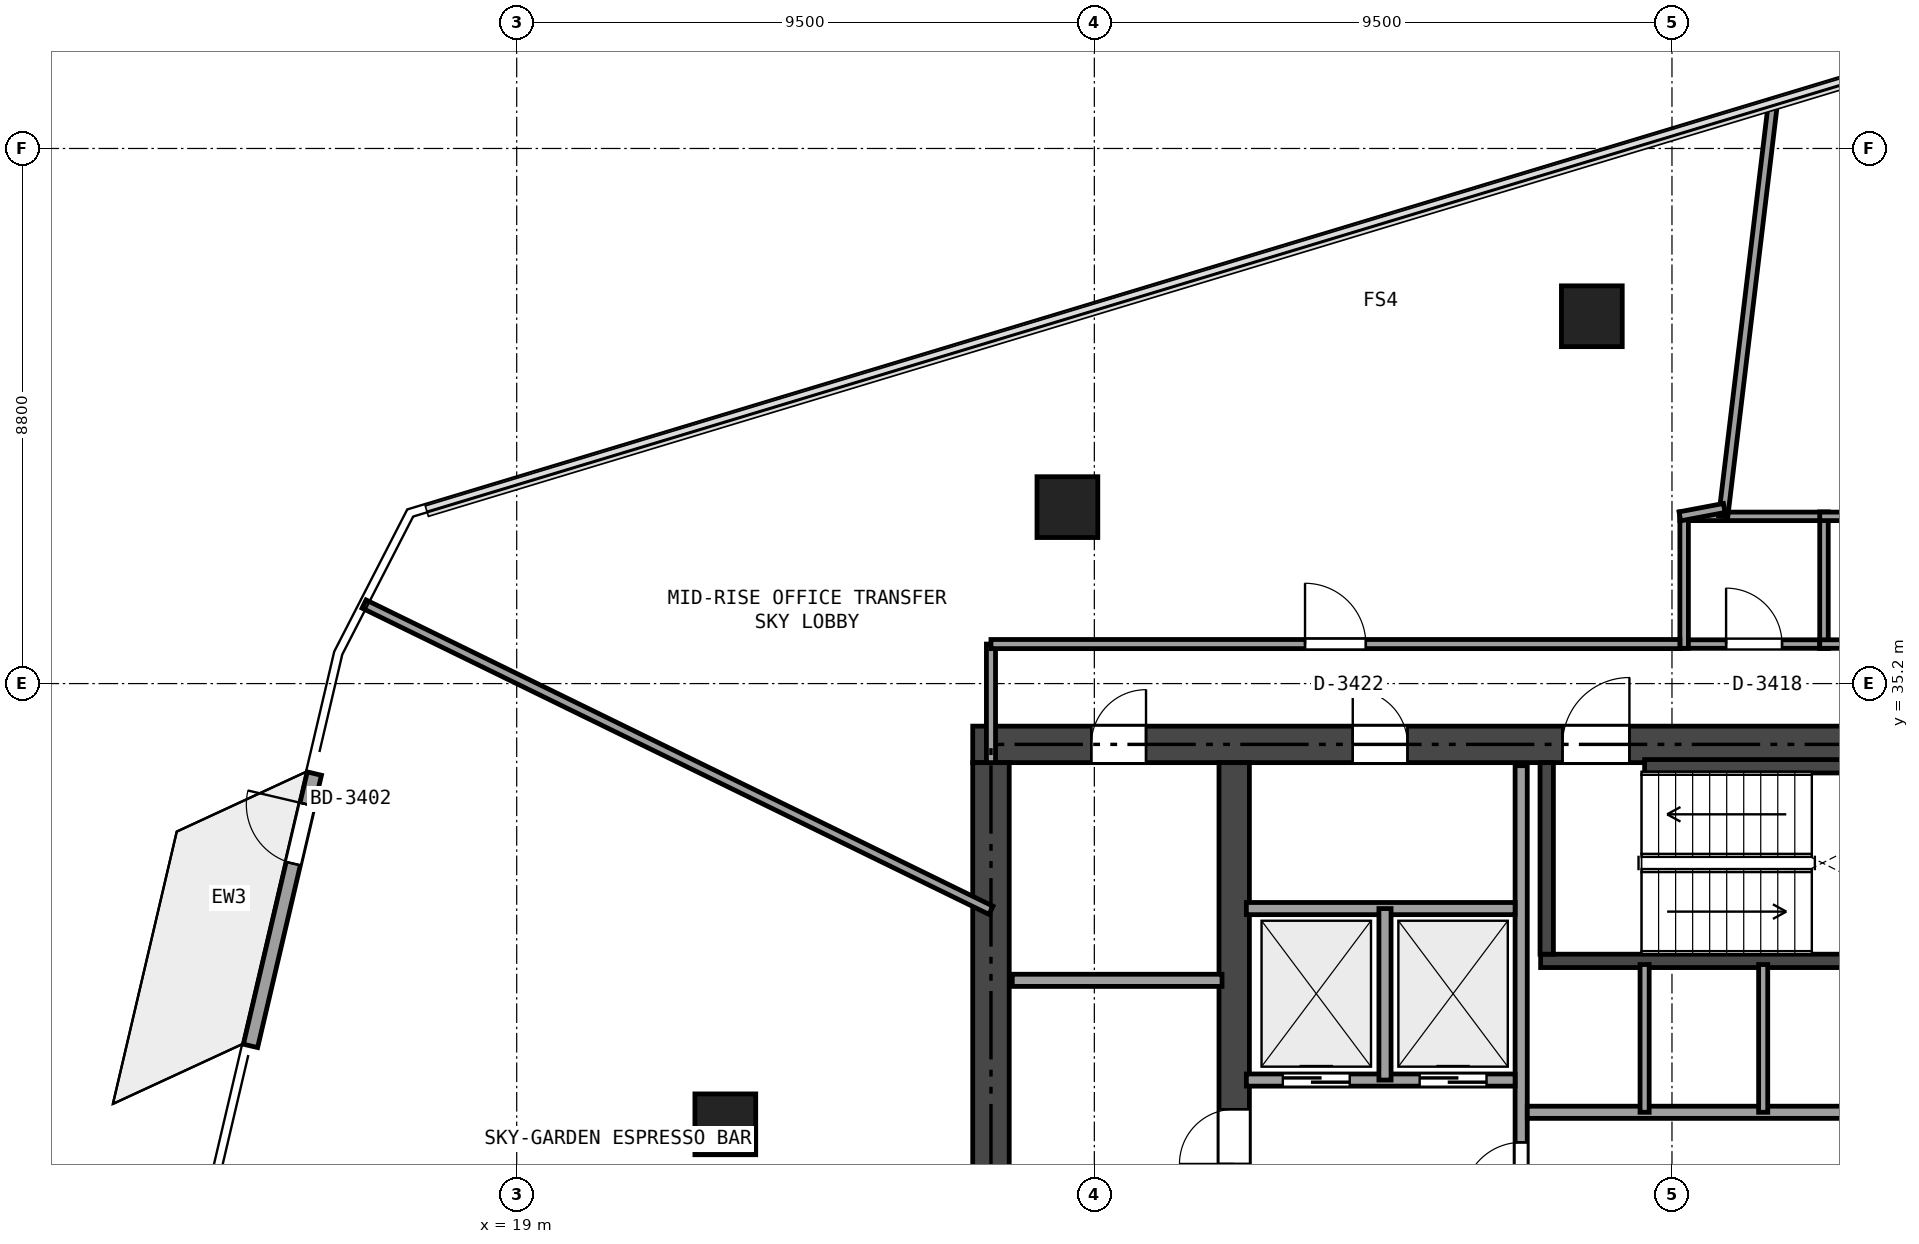
"""IFC4 building model, lengths in metres.
Left out: names, types, materials, properties, quantities, classifications, styles, units other than length and angle.
Written with IfcOpenShell. Run it as: python <this file> out.ifc"""

import sys

from ifc_helpers import new_model, si_unit, direction, frame, frame_2d, origin, origin_2d, place, context, subcontext, project, spatial, rectangle, extrude, element, fill, save


model = new_model("IFC4")
c1 = context("Model", 3, precision=1e-05, world=origin(), true_north=direction((0.0, 1.0)))
c2 = subcontext(c1, "Body", "Model", "MODEL_VIEW")
j1 = project(units=[si_unit("LENGTHUNIT", "METRE"), si_unit("PLANEANGLEUNIT", "RADIAN")], contexts=[c1])
p1 = place(None, origin())
s1 = spatial("IfcSite", under=j1, at=p1, CompositionType="ELEMENT")
p2 = place(p1, origin())
s2 = spatial("IfcBuilding", under=s1, at=p2, CompositionType="ELEMENT")
p3 = place(p2, frame((0.0, 0.0, 129.3)))
s3 = spatial("IfcBuildingStorey", under=s2, at=p3, CompositionType="ELEMENT", Elevation=129.3)
p4 = place(p3, frame((26.5, 34.2, 0.0), z_axis=(0.0, 0.0, 1.0), x_axis=(1.0, 0.0, 0.0)))
e1 = element("IfcWall", 1, at=p4, inside=s3, PredefinedType="SHEAR", context=c2, shape_type="SweptSolid", body=[
    extrude(rectangle(XDim=21.4, YDim=0.6, at=frame_2d((10.7, 0.0))), origin(), (0.0, 0.0, 1.0), 3.32),
])
p5 = place(p4, frame((9.7, 0.0, 0.0)))
e2 = element("IfcOpeningElement", 2, at=p5, cuts=e1, PredefinedType="OPENING", context=c2, shape_type="SweptSolid", body=[
    extrude(rectangle(XDim=1.1, YDim=2.15, at=frame_2d((0.55, 1.075))), frame((0.0, 0.31, 0.0), z_axis=(0.0, -1.0, 0.0), x_axis=(1.0, 0.0, 0.0)), (0.0, 0.0, 1.0), 0.62),
])
p6 = place(p4, frame((1.95, 0.0, 0.0)))
e3 = element("IfcOpeningElement", 3, at=p6, cuts=e1, PredefinedType="OPENING", context=c2, shape_type="SweptSolid", body=[
    extrude(rectangle(XDim=0.9, YDim=2.1, at=frame_2d((0.45, 1.05))), frame((0.0, 0.31, 0.0), z_axis=(0.0, -1.0, 0.0), x_axis=(1.0, 0.0, 0.0)), (0.0, 0.0, 1.0), 0.62),
])
p7 = place(p4, frame((6.25, 0.0, 0.0)))
e4 = element("IfcOpeningElement", 4, at=p7, cuts=e1, PredefinedType="OPENING", context=c2, shape_type="SweptSolid", body=[
    extrude(rectangle(XDim=0.9, YDim=2.1, at=frame_2d((0.45, 1.05))), frame((0.0, 0.31, 0.0), z_axis=(0.0, -1.0, 0.0), x_axis=(1.0, 0.0, 0.0)), (0.0, 0.0, 1.0), 0.62),
])
p8 = place(p3, frame((26.8, 18.9, 0.0), z_axis=(0.0, 0.0, 1.0), x_axis=(0.0, 1.0, 0.0)))
e5 = element("IfcWall", 5, at=p8, inside=s3, PredefinedType="SHEAR", context=c2, shape_type="SweptSolid", body=[
    extrude(rectangle(XDim=15.0, YDim=0.6, at=frame_2d((7.5, 0.0))), origin(), (0.0, 0.0, 1.0), 3.32),
])
p9 = place(p3, frame((30.8, 18.9, 0.0), z_axis=(0.0, 0.0, 1.0), x_axis=(0.0, 1.0, 0.0)))
e6 = element("IfcWall", 6, at=p9, inside=s3, PredefinedType="SHEAR", context=c2, shape_type="SweptSolid", body=[
    extrude(rectangle(XDim=15.0, YDim=0.5, at=frame_2d((7.5, 0.0))), origin(), (0.0, 0.0, 1.0), 3.32),
])
p10 = place(p9, frame((6.6, 0.0, 0.0)))
e7 = element("IfcOpeningElement", 7, at=p10, cuts=e6, PredefinedType="OPENING", context=c2, shape_type="SweptSolid", body=[
    extrude(rectangle(XDim=1.1, YDim=2.15, at=frame_2d((0.55, 1.075))), frame((0.0, 0.26, 0.0), z_axis=(0.0, -1.0, 0.0), x_axis=(1.0, 0.0, 0.0)), (0.0, 0.0, 1.0), 0.52),
])
p11 = place(p9, frame((8.4, 0.0, 0.0)))
e8 = element("IfcOpeningElement", 8, at=p11, cuts=e6, PredefinedType="OPENING", context=c2, shape_type="SweptSolid", body=[
    extrude(rectangle(XDim=0.9, YDim=2.1, at=frame_2d((0.45, 1.05))), frame((0.0, 0.26, 0.0), z_axis=(0.0, -1.0, 0.0), x_axis=(1.0, 0.0, 0.0)), (0.0, 0.0, 1.0), 0.52),
])
p12 = place(p3, frame((35.84, 30.64, 0.0), z_axis=(0.0, 0.0, 1.0), x_axis=(1.0, 0.0, 0.0)))
e9 = element("IfcWall", 9, at=p12, inside=s3, PredefinedType="SHEAR", context=c2, shape_type="SweptSolid", body=[
    extrude(rectangle(XDim=7.61, YDim=0.22, at=frame_2d((3.805, 0.0))), origin(), (0.0, 0.0, 1.0), 3.32),
])
p13 = place(p3, frame((35.94, 30.75, 0.0), z_axis=(0.0, 0.0, 1.0), x_axis=(0.0, 1.0, 0.0)))
e10 = element("IfcWall", 10, at=p13, inside=s3, PredefinedType="SHEAR", context=c2, shape_type="SweptSolid", body=[
    extrude(rectangle(XDim=3.15, YDim=0.22, at=frame_2d((1.575, 0.0))), origin(), (0.0, 0.0, 1.0), 3.32),
])
p14 = place(p3, frame((37.55, 33.84, 0.0), z_axis=(0.0, 0.0, 1.0), x_axis=(1.0, 0.0, 0.0)))
e11 = element("IfcWall", 11, at=p14, inside=s3, PredefinedType="SHEAR", context=c2, shape_type="SweptSolid", body=[
    extrude(rectangle(XDim=5.9, YDim=0.22, at=frame_2d((2.95, 0.0))), origin(), (0.0, 0.0, 1.0), 3.32),
])
for number, where, z_axis, x_axis in (
    (12, (36.682, 41.241, 0.0), (0.0, 0.0, 1.0), (1.0, 0.0, 0.0)),
    (13, (28.057, 38.102, 0.0), (0.0, 0.0, 1.0), (1.0, 0.0, 0.0)),
    (14, (22.431, 27.952, 0.0), (0.0, 0.0, 1.0), (1.0, 0.0, 0.0)),
):
    element("IfcColumn", number, at=place(p3, frame(where, z_axis=z_axis, x_axis=x_axis)), inside=s3, PredefinedType="COLUMN", context=c2, shape_type="SweptSolid", body=[
        extrude(rectangle(XDim=1.0, YDim=1.0, at=origin_2d()), origin(), (0.0, 0.0, 1.0), 3.32),
    ])
p15 = place(p3, frame((14.622, 29.242, 0.0), z_axis=(0.0, 0.0, 1.0), x_axis=(0.228296670508, 0.973591613684, 0.0)))
e15 = element("IfcWall", 15, at=p15, inside=s3, PredefinedType="SOLIDWALL", context=c2, shape_type="SweptSolid", body=[
    extrude(rectangle(XDim=4.6, YDim=0.24, at=frame_2d((2.3, 0.0))), origin(), (0.0, 0.0, 1.0), 3.32),
])
p16 = place(p15, frame((3.079, 0.0, 0.0)))
e16 = element("IfcOpeningElement", 16, at=p16, cuts=e15, PredefinedType="OPENING", context=c2, shape_type="SweptSolid", body=[
    extrude(rectangle(XDim=1.0, YDim=2.15, at=frame_2d((0.5, 1.075))), frame((0.0, 0.13, 0.0), z_axis=(0.0, -1.0, 0.0), x_axis=(1.0, 0.0, 0.0)), (0.0, 0.0, 1.0), 0.26),
])
p17 = place(p3, frame((27.15, 30.32, 0.0), z_axis=(0.0, 0.0, 1.0), x_axis=(1.0, 0.0, 0.0)))
e17 = element("IfcWall", 17, at=p17, inside=s3, PredefinedType="SOLIDWALL", context=c2, shape_type="SweptSolid", body=[
    extrude(rectangle(XDim=3.45, YDim=0.2, at=frame_2d((1.725, 0.0))), origin(), (0.0, 0.0, 1.0), 3.32),
])
p18 = place(p3, frame((35.52, 18.95, 0.0), z_axis=(0.0, 0.0, 1.0), x_axis=(0.0, 1.0, 0.0)))
e18 = element("IfcWall", 18, at=p18, inside=s3, PredefinedType="SOLIDWALL", context=c2, shape_type="SweptSolid", body=[
    extrude(rectangle(XDim=14.9, YDim=0.2, at=frame_2d((7.45, 0.0))), origin(), (0.0, 0.0, 1.0), 2.841),
])
p19 = place(p18, frame((7.755, 0.0, 0.0)))
e19 = element("IfcOpeningElement", 19, at=p19, cuts=e18, PredefinedType="OPENING", context=c2, shape_type="SweptSolid", body=[
    extrude(rectangle(XDim=0.95, YDim=2.15, at=frame_2d((0.475, 1.075))), frame((0.0, 0.11, 0.0), z_axis=(0.0, -1.0, 0.0), x_axis=(1.0, 0.0, 0.0)), (0.0, 0.0, 1.0), 0.22),
])
p20 = place(p18, frame((0.6, 0.0, 0.0)))
e20 = element("IfcOpeningElement", 20, at=p20, cuts=e18, PredefinedType="OPENING", context=c2, shape_type="SweptSolid", body=[
    extrude(rectangle(XDim=0.9, YDim=2.1, at=frame_2d((0.45, 1.05))), frame((0.0, 0.11, 0.0), z_axis=(0.0, -1.0, 0.0), x_axis=(1.0, 0.0, 0.0)), (0.0, 0.0, 1.0), 0.22),
])
p21 = place(p3, frame((31.0, 28.68, 0.0), z_axis=(0.0, 0.0, 1.0), x_axis=(1.0, 0.0, 0.0)))
e21 = element("IfcWall", 21, at=p21, inside=s3, PredefinedType="SOLIDWALL", context=c2, shape_type="SweptSolid", body=[
    extrude(rectangle(XDim=4.42, YDim=0.2, at=frame_2d((2.21, 0.0))), origin(), (0.0, 0.0, 1.0), 3.32),
])
p22 = place(p21, frame((0.6, 0.0, 0.0)))
e22 = element("IfcOpeningElement", 22, at=p22, cuts=e21, PredefinedType="OPENING", context=c2, shape_type="SweptSolid", body=[
    extrude(rectangle(XDim=1.1, YDim=2.15, at=frame_2d((0.55, 1.075))), frame((0.0, 0.11, 0.0), z_axis=(0.0, -1.0, 0.0), x_axis=(1.0, 0.0, 0.0)), (0.0, 0.0, 1.0), 0.22),
])
p23 = place(p21, frame((2.85, 0.0, 0.0)))
e23 = element("IfcOpeningElement", 23, at=p23, cuts=e21, PredefinedType="OPENING", context=c2, shape_type="SweptSolid", body=[
    extrude(rectangle(XDim=1.1, YDim=2.15, at=frame_2d((0.55, 1.075))), frame((0.0, 0.11, 0.0), z_axis=(0.0, -1.0, 0.0), x_axis=(1.0, 0.0, 0.0)), (0.0, 0.0, 1.0), 0.22),
])
p24 = place(p3, frame((31.0, 31.5, 0.0), z_axis=(0.0, 0.0, 1.0), x_axis=(1.0, 0.0, 0.0)))
e24 = element("IfcWall", 24, at=p24, inside=s3, PredefinedType="SOLIDWALL", context=c2, shape_type="SweptSolid", body=[
    extrude(rectangle(XDim=4.42, YDim=0.2, at=frame_2d((2.21, 0.0))), origin(), (0.0, 0.0, 1.0), 3.32),
])
p25 = place(p3, frame((33.28, 28.68, 0.0), z_axis=(0.0, 0.0, 1.0), x_axis=(0.0, 1.0, 0.0)))
e25 = element("IfcWall", 25, at=p25, inside=s3, PredefinedType="SOLIDWALL", context=c2, shape_type="SweptSolid", body=[
    extrude(rectangle(XDim=2.82, YDim=0.2, at=frame_2d((1.41, 0.0))), origin(), (0.0, 0.0, 1.0), 3.32),
])
p26 = place(p3, frame((35.62, 28.15, 0.0), z_axis=(0.0, 0.0, 1.0), x_axis=(1.0, 0.0, 0.0)))
e26 = element("IfcWall", 26, at=p26, inside=s3, PredefinedType="SOLIDWALL", context=c2, shape_type="SweptSolid", body=[
    extrude(rectangle(XDim=7.88, YDim=0.2, at=frame_2d((3.94, 0.0))), origin(), (0.0, 0.0, 1.0), 3.32),
])
for number, where, z_axis, x_axis in (
    (27, (37.55, 28.15, 0.0), (0.0, 0.0, 1.0), (0.0, 1.0, 0.0)),
    (28, (39.5, 28.15, 0.0), (0.0, 0.0, 1.0), (0.0, 1.0, 0.0)),
):
    element("IfcWall", number, at=place(p3, frame(where, z_axis=z_axis, x_axis=x_axis)), inside=s3, PredefinedType="PARTITIONING", context=c2, shape_type="SweptSolid", body=[
        extrude(rectangle(XDim=2.43, YDim=0.15, at=frame_2d((1.215, 0.0))), origin(), (0.0, 0.0, 1.0), 3.32),
    ])
p27 = place(p3, frame((38.13, 35.85, 0.0), z_axis=(0.0, 0.0, 1.0), x_axis=(1.0, 0.0, 0.0)))
e29 = element("IfcWall", 29, at=p27, inside=s3, PredefinedType="PARTITIONING", context=c2, shape_type="SweptSolid", body=[
    extrude(rectangle(XDim=2.44, YDim=0.14, at=frame_2d((1.22, 0.0))), origin(), (0.0, 0.0, 1.0), 3.32),
])
p28 = place(p27, frame((0.76, 0.0, 0.0)))
e30 = element("IfcOpeningElement", 30, at=p28, cuts=e29, PredefinedType="OPENING", context=c2, shape_type="SweptSolid", body=[
    extrude(rectangle(XDim=0.92, YDim=2.1, at=frame_2d((0.46, 1.05))), frame((0.0, 0.08, 0.0), z_axis=(0.0, -1.0, 0.0), x_axis=(1.0, 0.0, 0.0)), (0.0, 0.0, 1.0), 0.16),
])
p29 = place(p3, frame((40.5, 35.78, 0.0), z_axis=(0.0, 0.0, 1.0), x_axis=(0.0, 1.0, 0.0)))
e31 = element("IfcWall", 31, at=p29, inside=s3, PredefinedType="PARTITIONING", context=c2, shape_type="SweptSolid", body=[
    extrude(rectangle(XDim=2.24, YDim=0.14, at=frame_2d((1.12, 0.0))), origin(), (0.0, 0.0, 1.0), 2.949),
])
p30 = place(p3, frame((40.57, 37.95, 0.0), z_axis=(0.0, 0.0, 1.0), x_axis=(-1.0, 0.0, 0.0)))
e32 = element("IfcWall", 32, at=p30, inside=s3, PredefinedType="PARTITIONING", context=c2, shape_type="SweptSolid", body=[
    extrude(rectangle(XDim=2.44, YDim=0.14, at=frame_2d((1.22, 0.0))), origin(), (0.0, 0.0, 1.0), 2.949),
])
p31 = place(p3, frame((38.2, 38.02, 0.0), z_axis=(0.0, 0.0, 1.0), x_axis=(0.0, -1.0, 0.0)))
e33 = element("IfcWall", 33, at=p31, inside=s3, PredefinedType="PARTITIONING", context=c2, shape_type="SweptSolid", body=[
    extrude(rectangle(XDim=2.24, YDim=0.14, at=frame_2d((1.12, 0.0))), origin(), (0.0, 0.0, 1.0), 2.949),
])
p32 = place(p3, frame((40.43, 35.85, 0.0), z_axis=(0.0, 0.0, 1.0), x_axis=(1.0, 0.0, 0.0)))
e34 = element("IfcWall", 34, at=p32, inside=s3, PredefinedType="PARTITIONING", context=c2, shape_type="SweptSolid", body=[
    extrude(rectangle(XDim=2.44, YDim=0.14, at=frame_2d((1.22, 0.0))), origin(), (0.0, 0.0, 1.0), 2.949),
])
p33 = place(p32, frame((0.76, 0.0, 0.0)))
e35 = element("IfcOpeningElement", 35, at=p33, cuts=e34, PredefinedType="OPENING", context=c2, shape_type="SweptSolid", body=[
    extrude(rectangle(XDim=0.92, YDim=2.1, at=frame_2d((0.46, 1.05))), frame((0.0, 0.08, 0.0), z_axis=(0.0, -1.0, 0.0), x_axis=(1.0, 0.0, 0.0)), (0.0, 0.0, 1.0), 0.16),
])
p34 = place(p3, frame((42.87, 37.95, 0.0), z_axis=(0.0, 0.0, 1.0), x_axis=(-1.0, 0.0, 0.0)))
e36 = element("IfcWall", 36, at=p34, inside=s3, PredefinedType="PARTITIONING", context=c2, shape_type="SweptSolid", body=[
    extrude(rectangle(XDim=2.44, YDim=0.14, at=frame_2d((1.22, 0.0))), origin(), (0.0, 0.0, 1.0), 2.949),
])
p35 = place(p3, frame((39.663, 44.77, 0.0), z_axis=(0.0, 0.0, 1.0), x_axis=(-0.119383467709, -0.992848219839, 0.0)))
e37 = element("IfcWall", 37, at=p35, inside=s3, PredefinedType="PARTITIONING", context=c2, shape_type="SweptSolid", body=[
    extrude(rectangle(XDim=6.869, YDim=0.15, at=frame_2d((3.435, 0.0))), origin(), (0.0, 0.0, 1.0), 2.805),
])
p36 = place(p3, frame((16.49, 36.508, 0.0), z_axis=(0.0, 0.0, 1.0), x_axis=(0.898533562789, -0.4389048149, 0.0)))
e38 = element("IfcWall", 38, at=p36, inside=s3, PredefinedType="PARTITIONING", context=c2, shape_type="SweptSolid", body=[
    extrude(rectangle(XDim=11.474, YDim=0.15, at=frame_2d((5.737, 0.0))), origin(), (0.0, 0.0, 1.0), 2.805),
])
p37 = place(p3, frame((26.8, 33.9, 0.0), z_axis=(0.0, 0.0, 1.0), x_axis=(0.0, 1.0, 0.0)))
e39 = element("IfcWall", 39, at=p37, inside=s3, PredefinedType="PARTITIONING", context=c2, shape_type="SweptSolid", body=[
    extrude(rectangle(XDim=1.95, YDim=0.15, at=frame_2d((0.975, 0.0))), origin(), (0.0, 0.0, 1.0), 2.805),
])
p38 = place(p3, frame((26.8, 35.85, 0.0), z_axis=(0.0, 0.0, 1.0), x_axis=(1.0, 0.0, 0.0)))
e40 = element("IfcWall", 40, at=p38, inside=s3, PredefinedType="PARTITIONING", context=c2, shape_type="SweptSolid", body=[
    extrude(rectangle(XDim=11.33, YDim=0.15, at=frame_2d((5.665, 0.0))), origin(), (0.0, 0.0, 1.0), 2.687),
])
p39 = place(p38, frame((5.165, 0.0, 0.0)))
e41 = element("IfcOpeningElement", 41, at=p39, cuts=e40, PredefinedType="OPENING", context=c2, shape_type="SweptSolid", body=[
    extrude(rectangle(XDim=1.0, YDim=2.15, at=frame_2d((0.5, 1.075))), frame((0.0, 0.085, 0.0), z_axis=(0.0, -1.0, 0.0), x_axis=(1.0, 0.0, 0.0)), (0.0, 0.0, 1.0), 0.17),
])
p40 = place(p3, frame((38.13, 37.95, 0.0), z_axis=(0.0, 0.0, 1.0), x_axis=(0.982622104364, 0.185617348367, 0.0)))
e42 = element("IfcWall", 42, at=p40, inside=s3, PredefinedType="PARTITIONING", context=c2, shape_type="SweptSolid", body=[
    extrude(rectangle(XDim=0.743, YDim=0.15, at=frame_2d((0.372, 0.0))), origin(), (0.0, 0.0, 1.0), 3.32),
])
p41 = place(p16, origin())
e43 = element("IfcDoor", 43, at=p41, inside=s3, OperationType="SINGLE_SWING_RIGHT", PredefinedType="DOOR", context=c2, shape_type="SweptSolid", body=[
    extrude(rectangle(XDim=1.0, YDim=2.15, at=frame_2d((0.5, 1.075))), frame((0.0, 0.025, 0.0), z_axis=(0.0, -1.0, 0.0), x_axis=(1.0, 0.0, 0.0)), (0.0, 0.0, 1.0), 0.05),
])
fill(e16, e43)
p42 = place(p5, origin())
e44 = element("IfcDoor", 44, at=p42, inside=s3, OperationType="SINGLE_SWING_RIGHT", PredefinedType="DOOR", context=c2, shape_type="SweptSolid", body=[
    extrude(rectangle(XDim=1.1, YDim=2.15, at=frame_2d((0.55, 1.075))), frame((0.0, 0.025, 0.0), z_axis=(0.0, -1.0, 0.0), x_axis=(1.0, 0.0, 0.0)), (0.0, 0.0, 1.0), 0.05),
])
fill(e2, e44)
p43 = place(p19, origin())
e45 = element("IfcDoor", 45, at=p43, inside=s3, OperationType="SINGLE_SWING_LEFT", PredefinedType="DOOR", context=c2, shape_type="SweptSolid", body=[
    extrude(rectangle(XDim=0.95, YDim=2.15, at=frame_2d((0.475, 1.075))), frame((0.0, 0.025, 0.0), z_axis=(0.0, -1.0, 0.0), x_axis=(1.0, 0.0, 0.0)), (0.0, 0.0, 1.0), 0.05),
])
fill(e19, e45)
p44 = place(p11, origin())
e46 = element("IfcDoor", 46, at=p44, inside=s3, OperationType="SINGLE_SWING_LEFT", PredefinedType="DOOR", context=c2, shape_type="SweptSolid", body=[
    extrude(rectangle(XDim=0.9, YDim=2.1, at=frame_2d((0.45, 1.05))), frame((0.0, 0.025, 0.0), z_axis=(0.0, -1.0, 0.0), x_axis=(1.0, 0.0, 0.0)), (0.0, 0.0, 1.0), 0.05),
])
fill(e8, e46)
p45 = place(p6, origin())
e47 = element("IfcDoor", 47, at=p45, inside=s3, OperationType="SINGLE_SWING_RIGHT", PredefinedType="DOOR", context=c2, shape_type="SweptSolid", body=[
    extrude(rectangle(XDim=0.9, YDim=2.1, at=frame_2d((0.45, 1.05))), frame((0.0, 0.025, 0.0), z_axis=(0.0, -1.0, 0.0), x_axis=(1.0, 0.0, 0.0)), (0.0, 0.0, 1.0), 0.05),
])
fill(e3, e47)
p46 = place(p7, origin())
e48 = element("IfcDoor", 48, at=p46, inside=s3, OperationType="SINGLE_SWING_LEFT", PredefinedType="DOOR", context=c2, shape_type="SweptSolid", body=[
    extrude(rectangle(XDim=0.9, YDim=2.1, at=frame_2d((0.45, 1.05))), frame((0.0, 0.025, 0.0), z_axis=(0.0, -1.0, 0.0), x_axis=(1.0, 0.0, 0.0)), (0.0, 0.0, 1.0), 0.05),
])
fill(e4, e48)
p47 = place(p22, origin())
e49 = element("IfcDoor", 49, at=p47, inside=s3, OperationType="SLIDING_TO_LEFT", PredefinedType="DOOR", context=c2, shape_type="SweptSolid", body=[
    extrude(rectangle(XDim=1.1, YDim=2.15, at=frame_2d((0.55, 1.075))), frame((0.0, 0.025, 0.0), z_axis=(0.0, -1.0, 0.0), x_axis=(1.0, 0.0, 0.0)), (0.0, 0.0, 1.0), 0.05),
])
fill(e22, e49)
p48 = place(p23, origin())
e50 = element("IfcDoor", 50, at=p48, inside=s3, OperationType="SLIDING_TO_LEFT", PredefinedType="DOOR", context=c2, shape_type="SweptSolid", body=[
    extrude(rectangle(XDim=1.1, YDim=2.15, at=frame_2d((0.55, 1.075))), frame((0.0, 0.025, 0.0), z_axis=(0.0, -1.0, 0.0), x_axis=(1.0, 0.0, 0.0)), (0.0, 0.0, 1.0), 0.05),
])
fill(e23, e50)
p49 = place(p28, origin())
e51 = element("IfcDoor", 51, at=p49, inside=s3, OperationType="SINGLE_SWING_LEFT", PredefinedType="DOOR", context=c2, shape_type="SweptSolid", body=[
    extrude(rectangle(XDim=0.92, YDim=2.1, at=frame_2d((0.46, 1.05))), frame((0.0, 0.025, 0.0), z_axis=(0.0, -1.0, 0.0), x_axis=(1.0, 0.0, 0.0)), (0.0, 0.0, 1.0), 0.05),
])
fill(e30, e51)
p50 = place(p39, origin())
e52 = element("IfcDoor", 52, at=p50, inside=s3, OperationType="SINGLE_SWING_LEFT", PredefinedType="DOOR", context=c2, shape_type="SweptSolid", body=[
    extrude(rectangle(XDim=1.0, YDim=2.15, at=frame_2d((0.5, 1.075))), frame((0.0, 0.025, 0.0), z_axis=(0.0, -1.0, 0.0), x_axis=(1.0, 0.0, 0.0)), (0.0, 0.0, 1.0), 0.05),
])
fill(e41, e52)
save(model, sys.argv[1])
